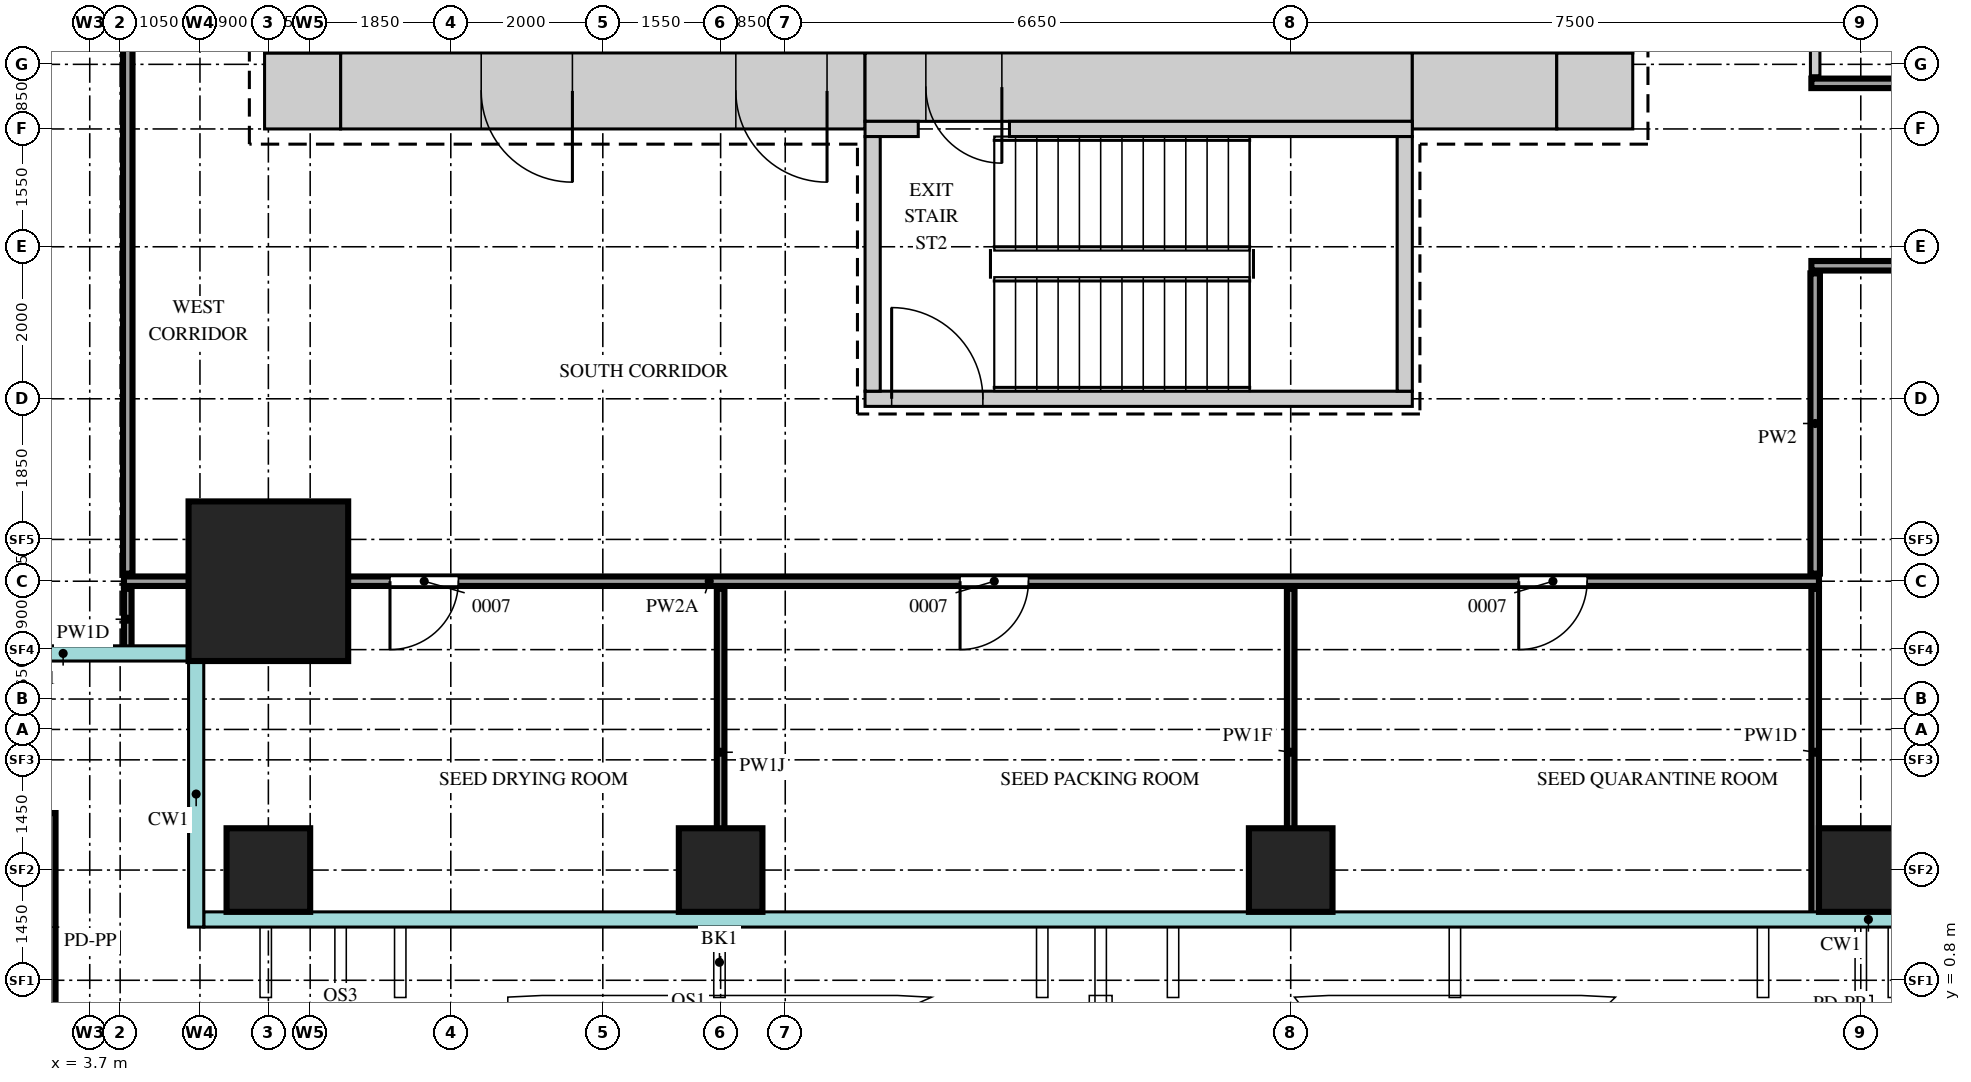
"""IFC4 building model, lengths in metres.
Left out: names, types, materials, properties, quantities, classifications, styles, units other than length and angle.
Written with IfcOpenShell. Run it as: python <this file> out.ifc"""

import sys

from ifc_helpers import new_model, si_unit, direction, frame, frame_2d, origin, origin_2d, place, context, subcontext, project, spatial, rectangle, extrude, source, transform, mapped, element, fill, save


model = new_model("IFC4")
c1 = context("Model", 3, precision=1e-05, world=origin(), true_north=direction((0.0, 1.0)))
c2 = subcontext(c1, "Body", "Model", "MODEL_VIEW")
j1 = project(units=[si_unit("LENGTHUNIT", "METRE"), si_unit("PLANEANGLEUNIT", "RADIAN")], contexts=[c1])
p1 = place(None, origin())
s1 = spatial("IfcSite", under=j1, at=p1, CompositionType="ELEMENT")
p2 = place(p1, origin())
s2 = spatial("IfcBuilding", under=s1, at=p2, CompositionType="ELEMENT")
p3 = place(p2, frame((0.0, 0.0, 101.5)))
s3 = spatial("IfcBuildingStorey", under=s2, at=p3, CompositionType="ELEMENT", Elevation=101.5)
m1 = source(origin(), c2, "Body", "SweptSolid", [
    extrude(rectangle(XDim=6.9, YDim=1.0, at=frame_2d((3.45, 0.0))), origin(), (0.0, 0.0, 1.0), 4.1),
])
p4 = place(p3, frame((7.0, 12.5, 0.0), z_axis=(0.0, 0.0, 1.0), x_axis=(1.0, 0.0, 0.0)))
e1 = element("IfcWall", 1, at=p4, inside=s3, PredefinedType="SHEAR", context=c2, shape_type="MappedRepresentation", body=[
    mapped(m1, transform((0.0, 0.0, 0.0))),
])
m2 = source(origin(), c2, "Body", "SweptSolid", [
    extrude(rectangle(XDim=1.2, YDim=2.1, at=frame_2d((0.6, 1.05))), frame((0.0, 0.51, 0.0), z_axis=(0.0, -1.0, 0.0), x_axis=(1.0, 0.0, 0.0)), (0.0, 0.0, 1.0), 1.02),
])
p5 = place(p4, frame((5.2, 0.0, 0.0)))
e2 = element("IfcOpeningElement", 2, at=p5, cuts=e1, PredefinedType="OPENING", context=c2, shape_type="MappedRepresentation", body=[
    mapped(m2, transform((0.0, 0.0, 0.0))),
])
p6 = place(p4, frame((1.85, 0.0, 0.0)))
e3 = element("IfcOpeningElement", 3, at=p6, cuts=e1, PredefinedType="OPENING", context=c2, shape_type="MappedRepresentation", body=[
    mapped(m2, transform((0.0, 0.0, 0.0))),
])
m3 = source(origin(), c2, "Body", "SweptSolid", [
    extrude(rectangle(XDim=7.2, YDim=0.9, at=frame_2d((3.6, 0.0))), origin(), (0.0, 0.0, 1.0), 4.1),
])
p7 = place(p3, frame((13.9, 12.55, 0.0), z_axis=(0.0, 0.0, 1.0), x_axis=(1.0, 0.0, 0.0)))
e4 = element("IfcWall", 4, at=p7, inside=s3, PredefinedType="SHEAR", context=c2, shape_type="MappedRepresentation", body=[
    mapped(m3, transform((0.0, 0.0, 0.0))),
])
m4 = source(origin(), c2, "Body", "SweptSolid", [
    extrude(rectangle(XDim=1.0, YDim=2.1, at=frame_2d((0.5, 1.05))), frame((0.0, 0.46, 0.0), z_axis=(0.0, -1.0, 0.0), x_axis=(1.0, 0.0, 0.0)), (0.0, 0.0, 1.0), 0.92),
])
p8 = place(p7, frame((0.8, 0.0, 0.0)))
e5 = element("IfcOpeningElement", 5, at=p8, cuts=e4, PredefinedType="OPENING", context=c2, shape_type="MappedRepresentation", body=[
    mapped(m4, transform((0.0, 0.0, 0.0))),
])
m5 = source(origin(), c2, "Body", "SweptSolid", [
    extrude(rectangle(XDim=1.9, YDim=1.0, at=frame_2d((0.95, 0.0))), origin(), (0.0, 0.0, 1.0), 4.1),
])
p9 = place(p3, frame((21.1, 12.5, 0.0), z_axis=(0.0, 0.0, 1.0), x_axis=(1.0, 0.0, 0.0)))
e6 = element("IfcWall", 6, at=p9, inside=s3, PredefinedType="SHEAR", context=c2, shape_type="MappedRepresentation", body=[
    mapped(m5, transform((0.0, 0.0, 0.0))),
])
m6 = source(origin(), c2, "Body", "SweptSolid", [
    extrude(rectangle(XDim=1.0, YDim=1.0, at=frame_2d((0.5, 0.0))), origin(), (0.0, 0.0, 1.0), 4.1),
])
for number, where, z_axis, x_axis in (
    (7, (23.0, 12.5, 0.0), (0.0, 0.0, 1.0), (1.0, 0.0, 0.0)),
    (8, (6.0, 12.5, 0.0), (0.0, 0.0, 1.0), (1.0, 0.0, 0.0)),
):
    element("IfcWall", number, at=place(p3, frame(where, z_axis=z_axis, x_axis=x_axis)), inside=s3, PredefinedType="SHEAR", context=c2, shape_type="MappedRepresentation", body=[
        mapped(m6, transform((0.0, 0.0, 0.0))),
    ])
m7 = source(origin(), c2, "Body", "SweptSolid", [
    extrude(rectangle(XDim=0.7, YDim=0.2, at=frame_2d((0.35, 0.0))), origin(), (0.0, 0.0, 1.0), 4.1),
])
p10 = place(p3, frame((13.9, 12.0, 0.0), z_axis=(0.0, 0.0, 1.0), x_axis=(1.0, 0.0, 0.0)))
e9 = element("IfcWall", 9, at=p10, inside=s3, PredefinedType="SHEAR", context=c2, shape_type="MappedRepresentation", body=[
    mapped(m7, transform((0.0, 0.0, 0.0))),
])
m8 = source(origin(), c2, "Body", "SweptSolid", [
    extrude(rectangle(XDim=5.3, YDim=0.2, at=frame_2d((2.65, 0.0))), origin(), (0.0, 0.0, 1.0), 4.1),
])
p11 = place(p3, frame((15.8, 12.0, 0.0), z_axis=(0.0, 0.0, 1.0), x_axis=(1.0, 0.0, 0.0)))
e10 = element("IfcWall", 10, at=p11, inside=s3, PredefinedType="SHEAR", context=c2, shape_type="MappedRepresentation", body=[
    mapped(m8, transform((0.0, 0.0, 0.0))),
])
m9 = source(origin(), c2, "Body", "SweptSolid", [
    extrude(rectangle(XDim=7.2, YDim=0.2, at=frame_2d((3.6, 0.0))), origin(), (0.0, 0.0, 1.0), 4.1),
])
p12 = place(p3, frame((13.9, 8.45, 0.0), z_axis=(0.0, 0.0, 1.0), x_axis=(1.0, 0.0, 0.0)))
e11 = element("IfcWall", 11, at=p12, inside=s3, PredefinedType="SHEAR", context=c2, shape_type="MappedRepresentation", body=[
    mapped(m9, transform((0.0, 0.0, 0.0))),
])
m10 = source(origin(), c2, "Body", "SweptSolid", [
    extrude(rectangle(XDim=1.2, YDim=2.1, at=frame_2d((0.6, 1.05))), frame((0.0, 0.11, 0.0), z_axis=(0.0, -1.0, 0.0), x_axis=(1.0, 0.0, 0.0)), (0.0, 0.0, 1.0), 0.22),
])
p13 = place(p12, frame((0.35, 0.0, 0.0)))
e12 = element("IfcOpeningElement", 12, at=p13, cuts=e11, PredefinedType="OPENING", context=c2, shape_type="MappedRepresentation", body=[
    mapped(m10, transform((0.0, 0.0, 0.0))),
])
m11 = source(origin(), c2, "Body", "SweptSolid", [
    extrude(rectangle(XDim=3.35, YDim=0.2, at=frame_2d((1.675, 0.0))), origin(), (0.0, 0.0, 1.0), 4.1),
])
for number, where, z_axis, x_axis in (
    (13, (21.0, 8.55, 0.0), (0.0, 0.0, 1.0), (0.0, 1.0, 0.0)),
    (14, (14.0, 8.55, 0.0), (0.0, 0.0, 1.0), (0.0, 1.0, 0.0)),
):
    element("IfcWall", number, at=place(p3, frame(where, z_axis=z_axis, x_axis=x_axis)), inside=s3, PredefinedType="SHEAR", context=c2, shape_type="MappedRepresentation", body=[
        mapped(m11, transform((0.0, 0.0, 0.0))),
    ])
m12 = source(origin(), c2, "Body", "SweptSolid", [
    extrude(rectangle(XDim=2.1, YDim=2.1, at=origin_2d()), origin(), (0.0, 0.0, 1.0), 4.4),
])
p14 = place(p3, frame((6.05, 6.05, 0.0), z_axis=(0.0, 0.0, 1.0), x_axis=(1.0, 0.0, 0.0)))
e15 = element("IfcColumn", 15, at=p14, inside=s3, PredefinedType="COLUMN", context=c2, shape_type="MappedRepresentation", body=[
    mapped(m12, transform((0.0, 0.0, 0.0))),
])
m13 = source(origin(), c2, "Body", "SweptSolid", [
    extrude(rectangle(XDim=1.1, YDim=1.1, at=origin_2d()), origin(), (0.0, 0.0, 1.0), 4.1),
])
for number, where, z_axis, x_axis in (
    (16, (6.05, 2.25, 0.0), (0.0, 0.0, 1.0), (1.0, 0.0, 0.0)),
    (17, (12.0, 2.25, 0.0), (0.0, 0.0, 1.0), (1.0, 0.0, 0.0)),
    (18, (19.5, 2.25, 0.0), (0.0, 0.0, 1.0), (1.0, 0.0, 0.0)),
    (19, (27.0, 2.25, 0.0), (0.0, 0.0, 1.0), (1.0, 0.0, 0.0)),
):
    element("IfcColumn", number, at=place(p3, frame(where, z_axis=z_axis, x_axis=x_axis)), inside=s3, PredefinedType="COLUMN", context=c2, shape_type="MappedRepresentation", body=[
        mapped(m13, transform((0.0, 0.0, 0.0))),
    ])
m14 = source(origin(), c2, "Body", "SweptSolid", [
    extrude(rectangle(XDim=3.0, YDim=0.25, at=frame_2d((1.5, 0.0))), origin(), (0.0, 0.0, 1.0), 1.1),
])
p15 = place(p3, frame((3.125, 3.0, 0.0), z_axis=(0.0, 0.0, 1.0), x_axis=(0.0, -1.0, 0.0)))
e20 = element("IfcWall", 20, at=p15, inside=s3, PredefinedType="SOLIDWALL", context=c2, shape_type="MappedRepresentation", body=[
    mapped(m14, transform((0.0, 0.0, 0.0))),
])
m15 = source(origin(), c2, "Body", "SweptSolid", [
    extrude(rectangle(XDim=4.3, YDim=0.1, at=frame_2d((2.15, 0.0))), origin(), (0.0, 0.0, 1.0), 3.65),
])
p16 = place(p3, frame((12.0, 1.65, 0.0), z_axis=(0.0, 0.0, 1.0), x_axis=(0.0, 1.0, 0.0)))
e21 = element("IfcWall", 21, at=p16, inside=s3, PredefinedType="PARTITIONING", context=c2, shape_type="MappedRepresentation", body=[
    mapped(m15, transform((0.0, 0.0, 0.0))),
])
m16 = source(origin(), c2, "Body", "SweptSolid", [
    extrude(rectangle(XDim=4.3, YDim=0.1, at=frame_2d((2.15, 0.0))), origin(), (0.0, 0.0, 1.0), 3.77),
])
p17 = place(p3, frame((19.5, 1.65, 0.0), z_axis=(0.0, 0.0, 1.0), x_axis=(0.0, 1.0, 0.0)))
e22 = element("IfcWall", 22, at=p17, inside=s3, PredefinedType="PARTITIONING", context=c2, shape_type="MappedRepresentation", body=[
    mapped(m16, transform((0.0, 0.0, 0.0))),
])
m17 = source(origin(), c2, "Body", "SweptSolid", [
    extrude(rectangle(XDim=4.3, YDim=0.1, at=frame_2d((2.15, 0.0))), origin(), (0.0, 0.0, 1.0), 4.2),
])
p18 = place(p3, frame((26.4, 1.65, 0.0), z_axis=(0.0, 0.0, 1.0), x_axis=(0.0, 1.0, 0.0)))
e23 = element("IfcWall", 23, at=p18, inside=s3, PredefinedType="PARTITIONING", context=c2, shape_type="MappedRepresentation", body=[
    mapped(m17, transform((0.0, 0.0, 0.0))),
])
m18 = source(origin(), c2, "Body", "SweptSolid", [
    extrude(rectangle(XDim=0.8, YDim=0.1, at=frame_2d((0.4, 0.0))), origin(), (0.0, 0.0, 1.0), 4.2),
])
p19 = place(p3, frame((4.2, 5.15, 0.0), z_axis=(0.0, 0.0, 1.0), x_axis=(0.0, 1.0, 0.0)))
e24 = element("IfcWall", 24, at=p19, inside=s3, PredefinedType="PARTITIONING", context=c2, shape_type="MappedRepresentation", body=[
    mapped(m18, transform((0.0, 0.0, 0.0))),
])
m19 = source(origin(), c2, "Body", "SweptSolid", [
    extrude(rectangle(XDim=22.3, YDim=0.125, at=frame_2d((11.15, 0.0))), origin(), (0.0, 0.0, 1.0), 3.55),
])
p20 = place(p3, frame((4.15, 6.05, 0.0), z_axis=(0.0, 0.0, 1.0), x_axis=(1.0, 0.0, 0.0)))
e25 = element("IfcWall", 25, at=p20, inside=s3, PredefinedType="PARTITIONING", context=c2, shape_type="MappedRepresentation", body=[
    mapped(m19, transform((0.0, 0.0, 0.0))),
])
m20 = source(origin(), c2, "Body", "SweptSolid", [
    extrude(rectangle(XDim=0.9, YDim=2.1, at=frame_2d((0.45, 1.05))), frame((0.0, 0.073, 0.0), z_axis=(0.0, -1.0, 0.0), x_axis=(1.0, 0.0, 0.0)), (0.0, 0.0, 1.0), 0.145),
])
p21 = place(p20, frame((3.5, 0.0, 0.0)))
e26 = element("IfcOpeningElement", 26, at=p21, cuts=e25, PredefinedType="OPENING", context=c2, shape_type="MappedRepresentation", body=[
    mapped(m20, transform((0.0, 0.0, 0.0))),
])
p22 = place(p20, frame((11.0, 0.0, 0.0)))
e27 = element("IfcOpeningElement", 27, at=p22, cuts=e25, PredefinedType="OPENING", context=c2, shape_type="MappedRepresentation", body=[
    mapped(m20, transform((0.0, 0.0, 0.0))),
])
p23 = place(p20, frame((18.35, 0.0, 0.0)))
e28 = element("IfcOpeningElement", 28, at=p23, cuts=e25, PredefinedType="OPENING", context=c2, shape_type="MappedRepresentation", body=[
    mapped(m20, transform((0.0, 0.0, 0.0))),
])
m21 = source(origin(), c2, "Body", "SweptSolid", [
    extrude(rectangle(XDim=41.8, YDim=0.125, at=frame_2d((20.9, 0.0))), origin(), (0.0, 0.0, 1.0), 4.2),
])
p24 = place(p3, frame((4.2, 6.15, 0.0), z_axis=(0.0, 0.0, 1.0), x_axis=(0.0, 1.0, 0.0)))
e29 = element("IfcWall", 29, at=p24, inside=s3, PredefinedType="PARTITIONING", context=c2, shape_type="MappedRepresentation", body=[
    mapped(m21, transform((0.0, 0.0, 0.0))),
])
p25 = place(p24, frame((7.2, 0.0, 0.0)))
e30 = element("IfcOpeningElement", 30, at=p25, cuts=e29, PredefinedType="OPENING", context=c2, shape_type="MappedRepresentation", body=[
    mapped(m20, transform((0.0, 0.0, 0.0))),
])
p26 = place(p24, frame((21.8, 0.0, 0.0)))
e31 = element("IfcOpeningElement", 31, at=p26, cuts=e29, PredefinedType="OPENING", context=c2, shape_type="MappedRepresentation", body=[
    mapped(m20, transform((0.0, 0.0, 0.0))),
])
p27 = place(p24, frame((33.3, 0.0, 0.0)))
e32 = element("IfcOpeningElement", 32, at=p27, cuts=e29, PredefinedType="OPENING", context=c2, shape_type="MappedRepresentation", body=[
    mapped(m20, transform((0.0, 0.0, 0.0))),
])
m22 = source(origin(), c2, "Body", "SweptSolid", [
    extrude(rectangle(XDim=3.95, YDim=0.125, at=frame_2d((1.975, 0.0))), origin(), (0.0, 0.0, 1.0), 4.2),
])
p28 = place(p3, frame((26.4, 6.15, 0.0), z_axis=(0.0, 0.0, 1.0), x_axis=(0.0, 1.0, 0.0)))
e33 = element("IfcWall", 33, at=p28, inside=s3, PredefinedType="PARTITIONING", context=c2, shape_type="MappedRepresentation", body=[
    mapped(m22, transform((0.0, 0.0, 0.0))),
])
m23 = source(origin(), c2, "Body", "SweptSolid", [
    extrude(rectangle(XDim=20.0, YDim=0.125, at=frame_2d((10.0, 0.0))), origin(), (0.0, 0.0, 1.0), 4.2),
])
p29 = place(p3, frame((26.35, 10.2, 0.0), z_axis=(0.0, 0.0, 1.0), x_axis=(1.0, 0.0, 0.0)))
e34 = element("IfcWall", 34, at=p29, inside=s3, PredefinedType="PARTITIONING", context=c2, shape_type="MappedRepresentation", body=[
    mapped(m23, transform((0.0, 0.0, 0.0))),
])
p30 = place(p29, frame((3.8, 0.0, 0.0)))
e35 = element("IfcOpeningElement", 35, at=p30, cuts=e34, PredefinedType="OPENING", context=c2, shape_type="MappedRepresentation", body=[
    mapped(m20, transform((0.0, 0.0, 0.0))),
])
p31 = place(p29, frame((11.3, 0.0, 0.0)))
e36 = element("IfcOpeningElement", 36, at=p31, cuts=e34, PredefinedType="OPENING", context=c2, shape_type="MappedRepresentation", body=[
    mapped(m20, transform((0.0, 0.0, 0.0))),
])
m24 = source(origin(), c2, "Body", "SweptSolid", [
    extrude(rectangle(XDim=1.2, YDim=2.1, at=frame_2d((0.6, 1.05))), frame((0.0, 0.073, 0.0), z_axis=(0.0, -1.0, 0.0), x_axis=(1.0, 0.0, 0.0)), (0.0, 0.0, 1.0), 0.145),
])
p32 = place(p29, frame((18.4, 0.0, 0.0)))
e37 = element("IfcOpeningElement", 37, at=p32, cuts=e34, PredefinedType="OPENING", context=c2, shape_type="MappedRepresentation", body=[
    mapped(m24, transform((0.0, 0.0, 0.0))),
])
m25 = source(origin(), c2, "Body", "SweptSolid", [
    extrude(rectangle(XDim=17.7, YDim=0.125, at=frame_2d((8.85, 0.0))), origin(), (0.0, 0.0, 1.0), 4.2),
])
p33 = place(p3, frame((26.35, 12.6, 0.0), z_axis=(0.0, 0.0, 1.0), x_axis=(1.0, 0.0, 0.0)))
e38 = element("IfcWall", 38, at=p33, inside=s3, PredefinedType="PARTITIONING", context=c2, shape_type="MappedRepresentation", body=[
    mapped(m25, transform((0.0, 0.0, 0.0))),
])
m26 = source(origin(), c2, "Body", "SweptSolid", [
    extrude(rectangle(XDim=23.2, YDim=0.125, at=frame_2d((11.6, 0.0))), origin(), (0.0, 0.0, 1.0), 4.2),
])
p34 = place(p3, frame((26.4, 12.7, 0.0), z_axis=(0.0, 0.0, 1.0), x_axis=(0.0, 1.0, 0.0)))
e39 = element("IfcWall", 39, at=p34, inside=s3, PredefinedType="PARTITIONING", context=c2, shape_type="MappedRepresentation", body=[
    mapped(m26, transform((0.0, 0.0, 0.0))),
])
p35 = place(p34, frame((2.15, 0.0, 0.0)))
e40 = element("IfcOpeningElement", 40, at=p35, cuts=e39, PredefinedType="OPENING", context=c2, shape_type="MappedRepresentation", body=[
    mapped(m20, transform((0.0, 0.0, 0.0))),
])
p36 = place(p34, frame((18.2, 0.0, 0.0)))
e41 = element("IfcOpeningElement", 41, at=p36, cuts=e39, PredefinedType="OPENING", context=c2, shape_type="MappedRepresentation", body=[
    mapped(m24, transform((0.0, 0.0, 0.0))),
])
m27 = source(origin(), c2, "Body", "SweptSolid", [
    extrude(rectangle(XDim=1.2, YDim=2.1, at=frame_2d((0.6, 1.05))), frame((0.0, 0.45, 0.0), z_axis=(0.0, -1.0, 0.0), x_axis=(1.0, 0.0, 0.0)), (0.0, 0.0, 1.0), 0.9),
])
p37 = place(p5, origin())
e42 = element("IfcDoor", 42, at=p37, inside=s3, OperationType="SINGLE_SWING_RIGHT", PredefinedType="DOOR", context=c2, shape_type="MappedRepresentation", body=[
    mapped(m27, transform((0.0, 0.0, 0.0))),
])
fill(e2, e42)
p38 = place(p6, origin())
e43 = element("IfcDoor", 43, at=p38, inside=s3, OperationType="SINGLE_SWING_RIGHT", PredefinedType="DOOR", context=c2, shape_type="MappedRepresentation", body=[
    mapped(m27, transform((0.0, 0.0, 0.0))),
])
fill(e3, e43)
m28 = source(origin(), c2, "Body", "SweptSolid", [
    extrude(rectangle(XDim=1.0, YDim=2.1, at=frame_2d((0.5, 1.05))), frame((0.0, 0.4, 0.0), z_axis=(0.0, -1.0, 0.0), x_axis=(1.0, 0.0, 0.0)), (0.0, 0.0, 1.0), 0.8),
])
p39 = place(p8, origin())
e44 = element("IfcDoor", 44, at=p39, inside=s3, OperationType="SINGLE_SWING_RIGHT", PredefinedType="DOOR", context=c2, shape_type="MappedRepresentation", body=[
    mapped(m28, transform((0.0, 0.0, 0.0))),
])
fill(e5, e44)
m29 = source(origin(), c2, "Body", "SweptSolid", [
    extrude(rectangle(XDim=0.9, YDim=2.1, at=frame_2d((0.45, 1.05))), frame((0.0, 0.025, 0.0), z_axis=(0.0, -1.0, 0.0), x_axis=(1.0, 0.0, 0.0)), (0.0, 0.0, 1.0), 0.05),
])
p40 = place(p21, origin())
e45 = element("IfcDoor", 45, at=p40, inside=s3, OperationType="SINGLE_SWING_LEFT", PredefinedType="DOOR", context=c2, shape_type="MappedRepresentation", body=[
    mapped(m29, transform((0.0, 0.0, 0.0))),
])
fill(e26, e45)
p41 = place(p22, origin())
e46 = element("IfcDoor", 46, at=p41, inside=s3, OperationType="SINGLE_SWING_LEFT", PredefinedType="DOOR", context=c2, shape_type="MappedRepresentation", body=[
    mapped(m29, transform((0.0, 0.0, 0.0))),
])
fill(e27, e46)
p42 = place(p23, origin())
e47 = element("IfcDoor", 47, at=p42, inside=s3, OperationType="SINGLE_SWING_LEFT", PredefinedType="DOOR", context=c2, shape_type="MappedRepresentation", body=[
    mapped(m29, transform((0.0, 0.0, 0.0))),
])
fill(e28, e47)
m30 = source(origin(), c2, "Body", "SweptSolid", [
    extrude(rectangle(XDim=1.2, YDim=2.1, at=frame_2d((0.6, 1.05))), frame((0.0, 0.025, 0.0), z_axis=(0.0, -1.0, 0.0), x_axis=(1.0, 0.0, 0.0)), (0.0, 0.0, 1.0), 0.05),
])
p43 = place(p13, origin())
e48 = element("IfcDoor", 48, at=p43, inside=s3, OperationType="SINGLE_SWING_RIGHT", PredefinedType="DOOR", context=c2, shape_type="MappedRepresentation", body=[
    mapped(m30, transform((0.0, 0.0, 0.0))),
])
fill(e12, e48)
save(model, sys.argv[1])
